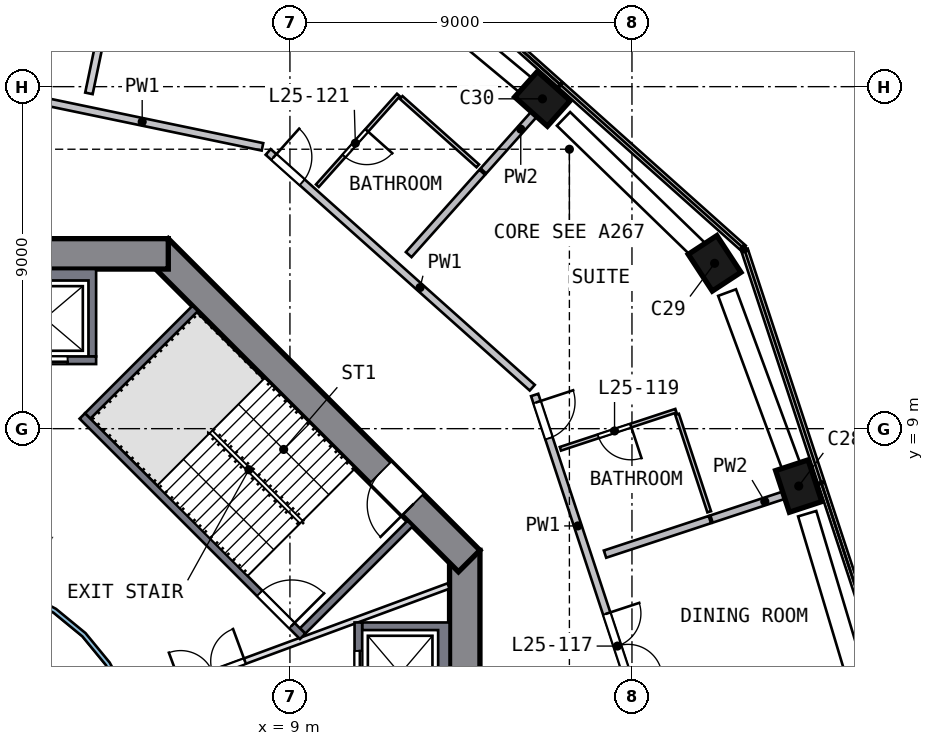
"""IFC4 building model, lengths in metres.
Left out: names, types, materials, properties, quantities, classifications, styles, units other than length and angle.
Written with IfcOpenShell. Run it as: python <this file> out.ifc"""

import sys

from ifc_helpers import new_model, si_unit, direction, frame, frame_2d, origin, origin_2d, place, context, subcontext, project, spatial, polyline, rectangle, outline, extrude, element, fill, save


model = new_model("IFC4")
c1 = context("Model", 3, precision=1e-05, world=origin(), true_north=direction((0.0, 1.0)))
c2 = subcontext(c1, "Body", "Model", "MODEL_VIEW")
j1 = project(units=[si_unit("LENGTHUNIT", "METRE"), si_unit("PLANEANGLEUNIT", "RADIAN")], contexts=[c1])
p1 = place(None, origin())
s1 = spatial("IfcSite", under=j1, at=p1, CompositionType="ELEMENT")
p2 = place(p1, origin())
s2 = spatial("IfcBuilding", under=s1, at=p2, CompositionType="ELEMENT")
p3 = place(p2, frame((0.0, 0.0, 107.0)))
s3 = spatial("IfcBuildingStorey", under=s2, at=p3, CompositionType="ELEMENT", Elevation=107.0)
p4 = place(p3, frame((22.422, 7.389, 0.0), z_axis=(-0.02809349, 0.08294545, 0.996158024), x_axis=(-0.311587523, 0.946173645, -0.087570825)))
e1 = element("IfcColumn", 1, at=p4, inside=s3, PredefinedType="COLUMN", context=c2, shape_type="SweptSolid", body=[
    extrude(rectangle(XDim=1.15, YDim=0.9, at=origin_2d()), origin(), (0.0, 0.0, 1.0), 4.206),
])
p5 = place(p3, frame((20.234, 13.261, 0.0), z_axis=(-0.049792348, 0.074688522, 0.995963025), x_axis=(0.545443267, -0.833327402, 0.089761257)))
e2 = element("IfcColumn", 2, at=p5, inside=s3, PredefinedType="COLUMN", context=c2, shape_type="SweptSolid", body=[
    extrude(rectangle(XDim=1.15, YDim=0.9, at=origin_2d()), origin(), (0.0, 0.0, 1.0), 4.207),
])
p6 = place(p3, frame((15.723, 17.61, 0.0), z_axis=(-0.065822166, 0.057812061, 0.996155213), x_axis=(-0.742878568, 0.663669485, -0.087602791)))
e3 = element("IfcColumn", 3, at=p6, inside=s3, PredefinedType="COLUMN", context=c2, shape_type="SweptSolid", body=[
    extrude(rectangle(XDim=1.15, YDim=0.9, at=origin_2d()), origin(), (0.0, 0.0, 1.0), 4.206),
])
p7 = place(p3, frame((13.6, -5.799, 0.0), z_axis=(0.0, 0.0, 1.0), x_axis=(0.0, 1.0, 0.0)))
e4 = element("IfcWall", 4, at=p7, inside=s3, PredefinedType="SHEAR", context=c2, shape_type="SweptSolid", body=[
    extrude(rectangle(XDim=11.598, YDim=0.8, at=frame_2d((5.799, 0.0))), origin(), (0.0, 0.0, 1.0), 4.5),
])
p8 = place(p7, frame((4.899, 0.0, 0.0)))
e5 = element("IfcOpeningElement", 5, at=p8, cuts=e4, PredefinedType="OPENING", context=c2, shape_type="SweptSolid", body=[
    extrude(rectangle(XDim=1.8, YDim=2.1, at=frame_2d((0.9, 1.05))), frame((0.0, 0.41, 0.0), z_axis=(0.0, -1.0, 0.0), x_axis=(1.0, 0.0, 0.0)), (0.0, 0.0, 1.0), 0.82),
])
p9 = place(p3, frame((13.717, 5.516, 0.0), z_axis=(0.0, 0.0, 1.0), x_axis=(-0.707106781, 0.707106781, 0.0)))
e6 = element("IfcWall", 6, at=p9, inside=s3, PredefinedType="SHEAR", context=c2, shape_type="SweptSolid", body=[
    extrude(rectangle(XDim=11.598, YDim=0.8, at=frame_2d((5.799, 0.0))), origin(), (0.0, 0.0, 1.0), 4.5),
])
p10 = place(p9, frame((2.099, 0.0, 0.0)))
e7 = element("IfcOpeningElement", 7, at=p10, cuts=e6, PredefinedType="OPENING", context=c2, shape_type="SweptSolid", body=[
    extrude(rectangle(XDim=1.2, YDim=2.1, at=frame_2d((0.6, 1.05))), frame((0.0, 0.41, 0.0), z_axis=(0.0, -1.0, 0.0), x_axis=(1.0, 0.0, 0.0)), (0.0, 0.0, 1.0), 0.82),
])
p11 = place(p3, frame((5.799, 13.6, 0.0), z_axis=(0.0, 0.0, 1.0), x_axis=(-1.0, 0.0, 0.0)))
e8 = element("IfcWall", 8, at=p11, inside=s3, PredefinedType="SHEAR", context=c2, shape_type="SweptSolid", body=[
    extrude(rectangle(XDim=11.598, YDim=0.8, at=frame_2d((5.799, 0.0))), origin(), (0.0, 0.0, 1.0), 4.5),
])
p12 = place(p11, frame((4.899, 0.0, 0.0)))
e9 = element("IfcOpeningElement", 9, at=p12, cuts=e8, PredefinedType="OPENING", context=c2, shape_type="SweptSolid", body=[
    extrude(rectangle(XDim=1.8, YDim=2.1, at=frame_2d((0.9, 1.05))), frame((0.0, 0.41, 0.0), z_axis=(0.0, -1.0, 0.0), x_axis=(1.0, 0.0, 0.0)), (0.0, 0.0, 1.0), 0.82),
])
p13 = place(p3, origin())
e10 = element("IfcWall", 10, at=p13, inside=s3, PredefinedType="SOLIDWALL", context=c2, shape_type="SweptSolid", body=[
    extrude(outline(polyline([(13.2, 3.9), (13.2, 1.2), (10.9, 1.2), (10.9, 1.4), (12.9, 1.4), (12.9, 3.7), (10.9, 3.7), (10.9, 3.9), (13.2, 3.9)])), origin(), (0.0, 0.0, 1.0), 4.19),
])
p14 = place(p3, frame((10.8, 1.2, 0.0), z_axis=(0.0, 0.0, 1.0), x_axis=(0.0, 1.0, 0.0)))
e11 = element("IfcWall", 11, at=p14, inside=s3, PredefinedType="SOLIDWALL", context=c2, shape_type="SweptSolid", body=[
    extrude(rectangle(XDim=2.7, YDim=0.2, at=frame_2d((1.35, 0.0))), origin(), (0.0, 0.0, 1.0), 4.19),
])
p15 = place(p14, frame((0.75, 0.0, 0.0)))
e12 = element("IfcOpeningElement", 12, at=p15, cuts=e11, PredefinedType="OPENING", context=c2, shape_type="SweptSolid", body=[
    extrude(rectangle(XDim=1.2, YDim=2.1, at=frame_2d((0.6, 1.05))), frame((0.0, 0.11, 0.0), z_axis=(0.0, -1.0, 0.0), x_axis=(1.0, 0.0, 0.0)), (0.0, 0.0, 1.0), 0.22),
])
p16 = place(p3, origin())
e13 = element("IfcWall", 13, at=p16, inside=s3, PredefinedType="SOLIDWALL", context=c2, shape_type="SweptSolid", body=[
    extrude(outline(polyline([(3.9, 13.2), (3.9, 10.9), (3.7, 10.9), (3.7, 12.9), (1.4, 12.9), (1.4, 10.9), (1.2, 10.9), (1.2, 13.2), (3.9, 13.2)])), origin(), (0.0, 0.0, 1.0), 4.19),
])
p17 = place(p3, frame((1.2, 10.8, 0.0), z_axis=(0.0, 0.0, 1.0), x_axis=(1.0, 0.0, 0.0)))
e14 = element("IfcWall", 14, at=p17, inside=s3, PredefinedType="SOLIDWALL", context=c2, shape_type="SweptSolid", body=[
    extrude(rectangle(XDim=2.7, YDim=0.2, at=frame_2d((1.35, 0.0))), origin(), (0.0, 0.0, 1.0), 4.19),
])
p18 = place(p17, frame((0.75, 0.0, 0.0)))
e15 = element("IfcOpeningElement", 15, at=p18, cuts=e14, PredefinedType="OPENING", context=c2, shape_type="SweptSolid", body=[
    extrude(rectangle(XDim=1.2, YDim=2.1, at=frame_2d((0.6, 1.05))), frame((0.0, 0.11, 0.0), z_axis=(0.0, -1.0, 0.0), x_axis=(1.0, 0.0, 0.0)), (0.0, 0.0, 1.0), 0.22),
])
p19 = place(p3, frame((3.535, 9.334, 0.0), z_axis=(0.0, 0.0, 1.0), x_axis=(0.707106781, -0.707106781, 0.0)))
e16 = element("IfcWall", 16, at=p19, inside=s3, PredefinedType="SOLIDWALL", context=c2, shape_type="SweptSolid", body=[
    extrude(rectangle(XDim=8.2, YDim=0.2, at=frame_2d((4.1, 0.0))), origin(), (0.0, 0.0, 1.0), 4.19),
])
p20 = place(p19, frame((6.6, 0.0, 0.0)))
e17 = element("IfcOpeningElement", 17, at=p20, cuts=e16, PredefinedType="OPENING", context=c2, shape_type="SweptSolid", body=[
    extrude(rectangle(XDim=1.2, YDim=2.1, at=frame_2d((0.6, 1.05))), frame((0.0, 0.11, 0.0), z_axis=(0.0, -1.0, 0.0), x_axis=(1.0, 0.0, 0.0)), (0.0, 0.0, 1.0), 0.22),
])
for number, where, z_axis, x_axis in (
    (18, (9.334, 3.677, 0.0), (0.0, 0.0, 1.0), (0.707, 0.707, 0.0)),
    (19, (3.677, 9.334, 0.0), (0.0, 0.0, 1.0), (0.707, 0.707, 0.0)),
):
    element("IfcWall", number, at=place(p3, frame(where, z_axis=z_axis, x_axis=x_axis)), inside=s3, PredefinedType="SOLIDWALL", context=c2, shape_type="SweptSolid", body=[
        extrude(rectangle(XDim=4.0, YDim=0.2, at=frame_2d((2.0, 0.0))), origin(), (0.0, 0.0, 1.0), 4.19),
    ])
p21 = place(p3, frame((4.813, 1.776, 0.0), z_axis=(0.0, 0.0, 1.0), x_axis=(0.938191915, 0.346115488, 0.0)))
e20 = element("IfcWall", 20, at=p21, inside=s3, PredefinedType="PARTITIONING", context=c2, shape_type="SweptSolid", body=[
    extrude(rectangle(XDim=8.91, YDim=0.15, at=frame_2d((4.455, 0.0))), origin(), (0.0, 0.0, 1.0), 4.19),
])
p22 = place(p21, frame((1.4, 0.0, 0.0)))
e21 = element("IfcOpeningElement", 21, at=p22, cuts=e20, PredefinedType="OPENING", context=c2, shape_type="SweptSolid", body=[
    extrude(rectangle(XDim=1.8, YDim=2.1, at=frame_2d((0.9, 1.05))), frame((0.0, 0.085, 0.0), z_axis=(0.0, -1.0, 0.0), x_axis=(1.0, 0.0, 0.0)), (0.0, 0.0, 1.0), 0.17),
])
p23 = place(p3, origin())
e22 = element("IfcWall", 22, at=p23, inside=s3, PredefinedType="SOLIDWALL", context=c2, shape_type="SweptSolid", body=[
    extrude(outline(polyline([(5.021, -0.999), (4.73, -1.959), (4.257, -2.844), (3.62, -3.62), (2.844, -4.257), (1.959, -4.73), (0.999, -5.021), (0.0, -5.12), (-0.999, -5.021), (-1.959, -4.73), (-2.844, -4.257), (-3.62, -3.62), (-4.257, -2.844), (-4.73, -1.959), (-5.021, -0.999), (-5.12, 0.0), (-5.021, 0.999), (-4.73, 1.959), (-4.257, 2.844), (-3.62, 3.62), (-2.844, 4.257), (-1.959, 4.73), (-0.999, 5.021), (0.0, 5.12), (0.999, 5.021), (1.959, 4.73), (2.844, 4.257), (3.62, 3.62), (4.257, 2.844), (4.73, 1.959), (5.021, 0.999), (5.12, 0.0), (5.021, -0.999)]), holes=[polyline([(4.904, 0.976), (4.619, 1.913), (4.157, 2.778), (3.535, 3.535), (2.778, 4.157), (1.913, 4.619), (0.976, 4.904), (0.0, 5.0), (-0.976, 4.904), (-1.913, 4.619), (-2.778, 4.157), (-3.535, 3.535), (-4.157, 2.778), (-4.619, 1.913), (-4.904, 0.976), (-5.0, 0.0), (-4.904, -0.976), (-4.619, -1.913), (-4.157, -2.778), (-3.535, -3.535), (-2.778, -4.157), (-1.913, -4.619), (-0.976, -4.904), (0.0, -5.0), (0.976, -4.904), (1.913, -4.619), (2.778, -4.157), (3.535, -3.535), (4.157, -2.778), (4.619, -1.913), (4.904, -0.976), (5.0, 0.0), (4.904, 0.976)])]), origin(), (0.0, 0.0, 1.0), 4.19),
])
p24 = place(p3, frame((-1.039, 18.355, 0.0), z_axis=(0.0, 0.0, 1.0), x_axis=(0.979011144, -0.203806722, 0.0)))
e23 = element("IfcWall", 23, at=p24, inside=s3, PredefinedType="SOLIDWALL", context=c2, shape_type="SweptSolid", body=[
    extrude(rectangle(XDim=9.516, YDim=0.2, at=frame_2d((4.758, 0.0))), origin(), (0.0, 0.0, 1.0), 4.19),
])
p25 = place(p24, frame((1.95, 0.0, 0.0)))
e24 = element("IfcOpeningElement", 24, at=p25, cuts=e23, PredefinedType="OPENING", context=c2, shape_type="SweptSolid", body=[
    extrude(rectangle(XDim=0.9, YDim=2.1, at=frame_2d((0.45, 1.05))), frame((0.0, 0.11, 0.0), z_axis=(0.0, -1.0, 0.0), x_axis=(1.0, 0.0, 0.0)), (0.0, 0.0, 1.0), 0.22),
])
p26 = place(p3, frame((8.427, 16.282, 0.0), z_axis=(0.0, 0.0, 1.0), x_axis=(0.745931151, -0.666023061, 0.0)))
e25 = element("IfcWall", 25, at=p26, inside=s3, PredefinedType="SOLIDWALL", context=c2, shape_type="SweptSolid", body=[
    extrude(rectangle(XDim=9.315, YDim=0.2, at=frame_2d((4.658, 0.0))), origin(), (0.0, 0.0, 1.0), 4.19),
])
p27 = place(p26, frame((0.2, 0.0, 0.0)))
e26 = element("IfcOpeningElement", 26, at=p27, cuts=e25, PredefinedType="OPENING", context=c2, shape_type="SweptSolid", body=[
    extrude(rectangle(XDim=1.0, YDim=2.1, at=frame_2d((0.5, 1.05))), frame((0.0, 0.11, 0.0), z_axis=(0.0, -1.0, 0.0), x_axis=(1.0, 0.0, 0.0)), (0.0, 0.0, 1.0), 0.22),
])
p28 = place(p3, frame((15.439, 9.887, 0.0), z_axis=(0.0, 0.0, 1.0), x_axis=(0.313002622, -0.949752262, 0.0)))
e27 = element("IfcWall", 27, at=p28, inside=s3, PredefinedType="SOLIDWALL", context=c2, shape_type="SweptSolid", body=[
    extrude(rectangle(XDim=9.316, YDim=0.2, at=frame_2d((4.658, 0.0))), origin(), (0.0, 0.0, 1.0), 4.19),
])
p29 = place(p28, frame((6.058, 0.0, 0.0)))
e28 = element("IfcOpeningElement", 28, at=p29, cuts=e27, PredefinedType="OPENING", context=c2, shape_type="SweptSolid", body=[
    extrude(rectangle(XDim=1.8, YDim=2.1, at=frame_2d((0.9, 1.05))), frame((0.0, 0.11, 0.0), z_axis=(0.0, -1.0, 0.0), x_axis=(1.0, 0.0, 0.0)), (0.0, 0.0, 1.0), 0.22),
])
p30 = place(p28, frame((0.2, 0.0, 0.0)))
e29 = element("IfcOpeningElement", 29, at=p30, cuts=e27, PredefinedType="OPENING", context=c2, shape_type="SweptSolid", body=[
    extrude(rectangle(XDim=1.0, YDim=2.1, at=frame_2d((0.5, 1.05))), frame((0.0, 0.11, 0.0), z_axis=(0.0, -1.0, 0.0), x_axis=(1.0, 0.0, 0.0)), (0.0, 0.0, 1.0), 0.22),
])
p31 = place(p3, frame((12.125, 13.58, 0.0), z_axis=(0.0, 0.0, 1.0), x_axis=(0.666057522, 0.74590038, 0.0)))
e30 = element("IfcWall", 30, at=p31, inside=s3, PredefinedType="SOLIDWALL", context=c2, shape_type="SweptSolid", body=[
    extrude(rectangle(XDim=2.905, YDim=0.2, at=frame_2d((1.452, 0.0))), origin(), (0.0, 0.0, 1.0), 4.19),
])
p32 = place(p3, frame((14.09, 15.781, 0.0), z_axis=(0.0, 0.0, 1.0), x_axis=(0.666030561, 0.745924454, 0.0)))
e31 = element("IfcWall", 31, at=p32, inside=s3, PredefinedType="SOLIDWALL", context=c2, shape_type="SweptSolid", body=[
    extrude(rectangle(XDim=2.952, YDim=0.2, at=frame_2d((1.476, 0.0))), origin(), (0.0, 0.0, 1.0), 4.19),
])
p33 = place(p3, frame((17.291, 5.698, 0.0), z_axis=(0.0, 0.0, 1.0), x_axis=(0.949753635, 0.312998455, 0.0)))
e32 = element("IfcWall", 32, at=p33, inside=s3, PredefinedType="SOLIDWALL", context=c2, shape_type="SweptSolid", body=[
    extrude(rectangle(XDim=2.905, YDim=0.2, at=frame_2d((1.452, 0.0))), origin(), (0.0, 0.0, 1.0), 4.19),
])
p34 = place(p3, frame((20.093, 6.622, 0.0), z_axis=(0.0, 0.0, 1.0), x_axis=(0.949744749, 0.313025416, 0.0)))
e33 = element("IfcWall", 33, at=p34, inside=s3, PredefinedType="SOLIDWALL", context=c2, shape_type="SweptSolid", body=[
    extrude(rectangle(XDim=2.952, YDim=0.2, at=frame_2d((1.476, 0.0))), origin(), (0.0, 0.0, 1.0), 4.19),
])
p35 = place(p3, frame((11.854, 17.781, 0.0), z_axis=(0.0, 0.0, 1.0), x_axis=(-0.666000609, -0.745951197, 0.0)))
e34 = element("IfcWall", 34, at=p35, inside=s3, PredefinedType="PARTITIONING", context=c2, shape_type="SweptSolid", body=[
    extrude(rectangle(XDim=3.2, YDim=0.1, at=frame_2d((1.6, 0.0))), origin(), (0.0, 0.0, 1.0), 4.19),
])
p36 = place(p35, frame((1.25, 0.0, 0.0)))
e35 = element("IfcOpeningElement", 35, at=p36, cuts=e34, PredefinedType="OPENING", context=c2, shape_type="SweptSolid", body=[
    extrude(rectangle(XDim=0.9, YDim=2.1, at=frame_2d((0.45, 1.05))), frame((0.0, 0.06, 0.0), z_axis=(0.0, -1.0, 0.0), x_axis=(1.0, 0.0, 0.0)), (0.0, 0.0, 1.0), 0.12),
])
p37 = place(p3, frame((11.928, 17.714, 0.0), z_axis=(0.0, 0.0, 1.0), x_axis=(0.74590076, -0.666057097, 0.0)))
e36 = element("IfcWall", 36, at=p37, inside=s3, PredefinedType="PARTITIONING", context=c2, shape_type="SweptSolid", body=[
    extrude(rectangle(XDim=2.7, YDim=0.1, at=frame_2d((1.35, 0.0))), origin(), (0.0, 0.0, 1.0), 4.19),
])
p38 = place(p3, frame((19.156, 9.472, 0.0), z_axis=(0.0, 0.0, 1.0), x_axis=(-0.949768639, -0.312952924, 0.0)))
e37 = element("IfcWall", 37, at=p38, inside=s3, PredefinedType="PARTITIONING", context=c2, shape_type="SweptSolid", body=[
    extrude(rectangle(XDim=3.2, YDim=0.1, at=frame_2d((1.6, 0.0))), origin(), (0.0, 0.0, 1.0), 4.19),
])
p39 = place(p38, frame((1.25, 0.0, 0.0)))
e38 = element("IfcOpeningElement", 38, at=p39, cuts=e37, PredefinedType="OPENING", context=c2, shape_type="SweptSolid", body=[
    extrude(rectangle(XDim=0.9, YDim=2.1, at=frame_2d((0.45, 1.05))), frame((0.0, 0.06, 0.0), z_axis=(0.0, -1.0, 0.0), x_axis=(1.0, 0.0, 0.0)), (0.0, 0.0, 1.0), 0.12),
])
p40 = place(p3, frame((19.188, 9.377, 0.0), z_axis=(0.0, 0.0, 1.0), x_axis=(0.313052071, -0.949735964, 0.0)))
e39 = element("IfcWall", 39, at=p40, inside=s3, PredefinedType="PARTITIONING", context=c2, shape_type="SweptSolid", body=[
    extrude(rectangle(XDim=2.7, YDim=0.1, at=frame_2d((1.35, 0.0))), origin(), (0.0, 0.0, 1.0), 4.19),
])
p41 = place(p3, frame((4.914, 23.602, 0.0), z_axis=(0.0, 0.0, 1.0), x_axis=(-0.203825422, -0.979007251, 0.0)))
e40 = element("IfcWall", 40, at=p41, inside=s3, PredefinedType="SOLIDWALL", context=c2, shape_type="SweptSolid", body=[
    extrude(rectangle(XDim=5.903, YDim=0.2, at=frame_2d((2.951, 0.0))), origin(), (0.0, 0.0, 1.0), 4.19),
])
p42 = place(p15, origin())
e41 = element("IfcDoor", 41, at=p42, inside=s3, OperationType="DOUBLE_DOOR_SLIDING", PredefinedType="DOOR", context=c2, shape_type="SweptSolid", body=[
    extrude(rectangle(XDim=1.2, YDim=2.1, at=frame_2d((0.6, 1.05))), frame((0.0, 0.025, 0.0), z_axis=(0.0, -1.0, 0.0), x_axis=(1.0, 0.0, 0.0)), (0.0, 0.0, 1.0), 0.05),
])
fill(e12, e41)
p43 = place(p18, origin())
e42 = element("IfcDoor", 42, at=p43, inside=s3, OperationType="DOUBLE_DOOR_SLIDING", PredefinedType="DOOR", context=c2, shape_type="SweptSolid", body=[
    extrude(rectangle(XDim=1.2, YDim=2.1, at=frame_2d((0.6, 1.05))), frame((0.0, 0.025, 0.0), z_axis=(0.0, -1.0, 0.0), x_axis=(1.0, 0.0, 0.0)), (0.0, 0.0, 1.0), 0.05),
])
fill(e15, e42)
p44 = place(p20, origin())
e43 = element("IfcDoor", 43, at=p44, inside=s3, OperationType="SINGLE_SWING_RIGHT", PredefinedType="DOOR", context=c2, shape_type="SweptSolid", body=[
    extrude(rectangle(XDim=1.2, YDim=2.1, at=frame_2d((0.6, 1.05))), frame((0.0, 0.025, 0.0), z_axis=(0.0, -1.0, 0.0), x_axis=(1.0, 0.0, 0.0)), (0.0, 0.0, 1.0), 0.05),
])
fill(e17, e43)
p45 = place(p10, origin())
e44 = element("IfcDoor", 44, at=p45, inside=s3, OperationType="SINGLE_SWING_LEFT", PredefinedType="DOOR", context=c2, shape_type="SweptSolid", body=[
    extrude(rectangle(XDim=1.2, YDim=2.1, at=frame_2d((0.6, 1.05))), frame((0.0, 0.025, 0.0), z_axis=(0.0, -1.0, 0.0), x_axis=(1.0, 0.0, 0.0)), (0.0, 0.0, 1.0), 0.05),
])
fill(e7, e44)
p46 = place(p22, origin())
e45 = element("IfcDoor", 45, at=p46, inside=s3, OperationType="DOUBLE_DOOR_SINGLE_SWING", PredefinedType="DOOR", context=c2, shape_type="SweptSolid", body=[
    extrude(rectangle(XDim=1.8, YDim=2.1, at=frame_2d((0.9, 1.05))), frame((0.0, 0.025, 0.0), z_axis=(0.0, -1.0, 0.0), x_axis=(1.0, 0.0, 0.0)), (0.0, 0.0, 1.0), 0.05),
])
fill(e21, e45)
p47 = place(p29, origin())
e46 = element("IfcDoor", 46, at=p47, inside=s3, OperationType="DOUBLE_DOOR_SINGLE_SWING", PredefinedType="DOOR", context=c2, shape_type="SweptSolid", body=[
    extrude(rectangle(XDim=1.8, YDim=2.1, at=frame_2d((0.9, 1.05))), frame((0.0, 0.025, 0.0), z_axis=(0.0, -1.0, 0.0), x_axis=(1.0, 0.0, 0.0)), (0.0, 0.0, 1.0), 0.05),
])
fill(e28, e46)
p48 = place(p30, origin())
e47 = element("IfcDoor", 47, at=p48, inside=s3, OperationType="SINGLE_SWING_LEFT", PredefinedType="DOOR", context=c2, shape_type="SweptSolid", body=[
    extrude(rectangle(XDim=1.0, YDim=2.1, at=frame_2d((0.5, 1.05))), frame((0.0, 0.025, 0.0), z_axis=(0.0, -1.0, 0.0), x_axis=(1.0, 0.0, 0.0)), (0.0, 0.0, 1.0), 0.05),
])
fill(e29, e47)
p49 = place(p39, origin())
e48 = element("IfcDoor", 48, at=p49, inside=s3, OperationType="SINGLE_SWING_LEFT", PredefinedType="DOOR", context=c2, shape_type="SweptSolid", body=[
    extrude(rectangle(XDim=0.9, YDim=2.1, at=frame_2d((0.45, 1.05))), frame((0.0, 0.025, 0.0), z_axis=(0.0, -1.0, 0.0), x_axis=(1.0, 0.0, 0.0)), (0.0, 0.0, 1.0), 0.05),
])
fill(e38, e48)
p50 = place(p27, origin())
e49 = element("IfcDoor", 49, at=p50, inside=s3, OperationType="SINGLE_SWING_LEFT", PredefinedType="DOOR", context=c2, shape_type="SweptSolid", body=[
    extrude(rectangle(XDim=1.0, YDim=2.1, at=frame_2d((0.5, 1.05))), frame((0.0, 0.025, 0.0), z_axis=(0.0, -1.0, 0.0), x_axis=(1.0, 0.0, 0.0)), (0.0, 0.0, 1.0), 0.05),
])
fill(e26, e49)
p51 = place(p36, origin())
e50 = element("IfcDoor", 50, at=p51, inside=s3, OperationType="SINGLE_SWING_LEFT", PredefinedType="DOOR", context=c2, shape_type="SweptSolid", body=[
    extrude(rectangle(XDim=0.9, YDim=2.1, at=frame_2d((0.45, 1.05))), frame((0.0, 0.025, 0.0), z_axis=(0.0, -1.0, 0.0), x_axis=(1.0, 0.0, 0.0)), (0.0, 0.0, 1.0), 0.05),
])
fill(e35, e50)
save(model, sys.argv[1])
